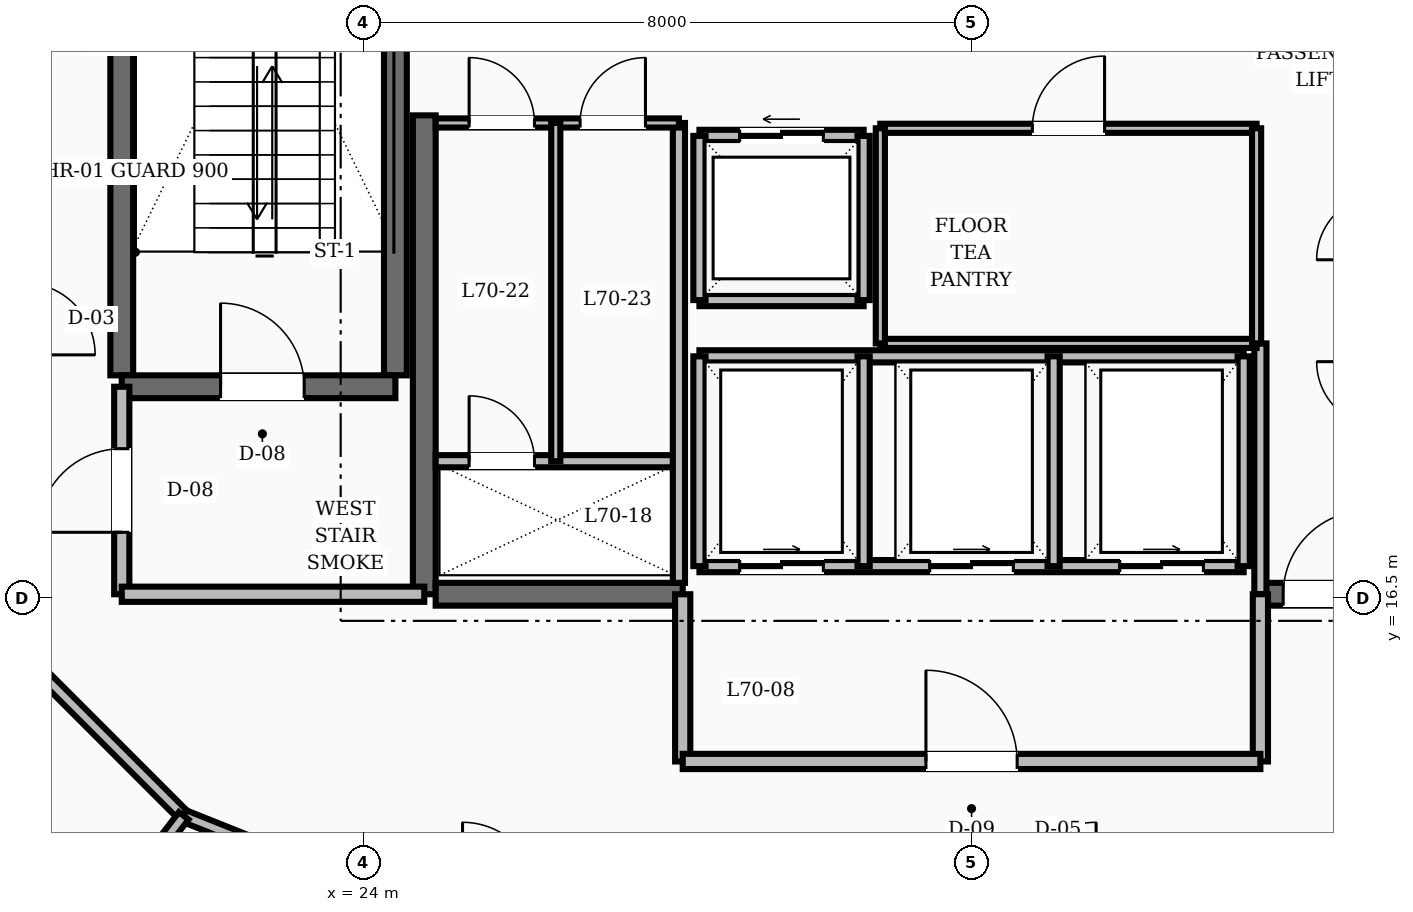
"""IFC4 building model, lengths in metres.
Left out: names, types, materials, properties, quantities, classifications, styles, units other than length and angle.
Written with IfcOpenShell. Run it as: python <this file> out.ifc"""

import sys

from ifc_helpers import new_model, si_unit, direction, frame, frame_2d, origin, place, context, subcontext, project, spatial, rectangle, extrude, element, fill, save


model = new_model("IFC4")
c1 = context("Model", 3, precision=1e-05, world=origin(), true_north=direction((0.0, 1.0)))
c2 = subcontext(c1, "Body", "Model", "MODEL_VIEW")
j1 = project(units=[si_unit("LENGTHUNIT", "METRE"), si_unit("PLANEANGLEUNIT", "RADIAN")], contexts=[c1])
p1 = place(None, origin())
s1 = spatial("IfcSite", under=j1, at=p1, CompositionType="ELEMENT")
p2 = place(p1, origin())
s2 = spatial("IfcBuilding", under=s1, at=p2, CompositionType="ELEMENT")
p3 = place(p2, frame((0.0, 0.0, 268.8)))
s3 = spatial("IfcBuildingStorey", under=s2, at=p3, CompositionType="ELEMENT", Elevation=268.8)
p4 = place(p3, frame((24.8, 16.55, 0.0), z_axis=(0.0, 0.0, 1.0), x_axis=(0.0, 1.0, 0.0)))
e1 = element("IfcWall", 1, at=p4, inside=s3, PredefinedType="SHEAR", context=c2, shape_type="SweptSolid", body=[
    extrude(rectangle(XDim=6.3, YDim=0.3, at=frame_2d((3.15, 0.0))), origin(), (0.0, 0.0, 1.0), 3.6),
])
p5 = place(p3, frame((24.95, 16.55, 0.0), z_axis=(0.0, 0.0, 1.0), x_axis=(1.0, 0.0, 0.0)))
e2 = element("IfcWall", 2, at=p5, inside=s3, PredefinedType="SHEAR", context=c2, shape_type="SweptSolid", body=[
    extrude(rectangle(XDim=3.25, YDim=0.3, at=frame_2d((1.625, 0.0))), origin(), (0.0, 0.0, 1.0), 3.6),
])
p6 = place(p3, frame((35.8, 16.55, 0.0), z_axis=(0.0, 0.0, 1.0), x_axis=(1.0, 0.0, 0.0)))
e3 = element("IfcWall", 3, at=p6, inside=s3, PredefinedType="SHEAR", context=c2, shape_type="SweptSolid", body=[
    extrude(rectangle(XDim=3.25, YDim=0.3, at=frame_2d((1.625, 0.0))), origin(), (0.0, 0.0, 1.0), 3.6),
])
p7 = place(p6, frame((0.3, 0.0, 0.0)))
e4 = element("IfcOpeningElement", 4, at=p7, cuts=e3, PredefinedType="OPENING", context=c2, shape_type="SweptSolid", body=[
    extrude(rectangle(XDim=1.1, YDim=2.1, at=frame_2d((0.55, 1.05))), frame((0.0, 0.16, 0.0), z_axis=(0.0, -1.0, 0.0), x_axis=(1.0, 0.0, 0.0)), (0.0, 0.0, 1.0), 0.32),
])
for number, where, z_axis, x_axis in (
    (5, (20.82, 19.43, 0.0), (0.0, 0.0, 1.0), (0.0, 1.0, 0.0)),
    (6, (24.42, 19.43, 0.0), (0.0, 0.0, 1.0), (0.0, 1.0, 0.0)),
):
    element("IfcWall", number, at=place(p3, frame(where, z_axis=z_axis, x_axis=x_axis)), inside=s3, PredefinedType="SHEAR", context=c2, shape_type="SweptSolid", body=[
        extrude(rectangle(XDim=8.74, YDim=0.3, at=frame_2d((4.37, 0.0))), origin(), (0.0, 0.0, 1.0), 3.6),
    ])
p8 = place(p3, frame((20.82, 19.28, 0.0), z_axis=(0.0, 0.0, 1.0), x_axis=(1.0, 0.0, 0.0)))
e7 = element("IfcWall", 7, at=p8, inside=s3, PredefinedType="SHEAR", context=c2, shape_type="SweptSolid", body=[
    extrude(rectangle(XDim=3.6, YDim=0.3, at=frame_2d((1.8, 0.0))), origin(), (0.0, 0.0, 1.0), 3.6),
])
p9 = place(p8, frame((1.3, 0.0, 0.0)))
e8 = element("IfcOpeningElement", 8, at=p9, cuts=e7, PredefinedType="OPENING", context=c2, shape_type="SweptSolid", body=[
    extrude(rectangle(XDim=1.1, YDim=2.1, at=frame_2d((0.55, 1.05))), frame((0.0, 0.16, 0.0), z_axis=(0.0, -1.0, 0.0), x_axis=(1.0, 0.0, 0.0)), (0.0, 0.0, 1.0), 0.32),
])
p10 = place(p3, frame((20.82, 16.55, 0.0), z_axis=(0.0, 0.0, 1.0), x_axis=(0.0, 1.0, 0.0)))
e9 = element("IfcWall", 9, at=p10, inside=s3, PredefinedType="SOLIDWALL", context=c2, shape_type="SweptSolid", body=[
    extrude(rectangle(XDim=2.73, YDim=0.2, at=frame_2d((1.365, 0.0))), origin(), (0.0, 0.0, 1.0), 2.87),
])
p11 = place(p10, frame((0.815, 0.0, 0.0)))
e10 = element("IfcOpeningElement", 10, at=p11, cuts=e9, PredefinedType="OPENING", context=c2, shape_type="SweptSolid", body=[
    extrude(rectangle(XDim=1.1, YDim=2.1, at=frame_2d((0.55, 1.05))), frame((0.0, 0.11, 0.0), z_axis=(0.0, -1.0, 0.0), x_axis=(1.0, 0.0, 0.0)), (0.0, 0.0, 1.0), 0.22),
])
p12 = place(p3, frame((20.82, 16.55, 0.0), z_axis=(0.0, 0.0, 1.0), x_axis=(1.0, 0.0, 0.0)))
e11 = element("IfcWall", 11, at=p12, inside=s3, PredefinedType="SOLIDWALL", context=c2, shape_type="SweptSolid", body=[
    extrude(rectangle(XDim=3.98, YDim=0.2, at=frame_2d((1.99, 0.0))), origin(), (0.0, 0.0, 1.0), 2.87),
])
p13 = place(p3, frame((35.8, 16.55, 0.0), z_axis=(0.0, 0.0, 1.0), x_axis=(0.0, 1.0, 0.0)))
e12 = element("IfcWall", 12, at=p13, inside=s3, PredefinedType="SOLIDWALL", context=c2, shape_type="SweptSolid", body=[
    extrude(rectangle(XDim=3.3, YDim=0.16, at=frame_2d((1.65, 0.0))), origin(), (0.0, 0.0, 1.0), 2.87),
])
for number, where, z_axis, x_axis in (
    (13, (28.2, 14.35, 0.0), (0.0, 0.0, 1.0), (0.0, 1.0, 0.0)),
    (14, (35.8, 14.35, 0.0), (0.0, 0.0, 1.0), (0.0, 1.0, 0.0)),
):
    element("IfcWall", number, at=place(p3, frame(where, z_axis=z_axis, x_axis=x_axis)), inside=s3, PredefinedType="SOLIDWALL", context=c2, shape_type="SweptSolid", body=[
        extrude(rectangle(XDim=2.2, YDim=0.2, at=frame_2d((1.1, 0.0))), origin(), (0.0, 0.0, 1.0), 2.87),
    ])
p14 = place(p3, frame((28.2, 14.35, 0.0), z_axis=(0.0, 0.0, 1.0), x_axis=(1.0, 0.0, 0.0)))
e15 = element("IfcWall", 15, at=p14, inside=s3, PredefinedType="SOLIDWALL", context=c2, shape_type="SweptSolid", body=[
    extrude(rectangle(XDim=7.6, YDim=0.2, at=frame_2d((3.8, 0.0))), origin(), (0.0, 0.0, 1.0), 2.87),
])
p15 = place(p14, frame((3.2, 0.0, 0.0)))
e16 = element("IfcOpeningElement", 16, at=p15, cuts=e15, PredefinedType="OPENING", context=c2, shape_type="SweptSolid", body=[
    extrude(rectangle(XDim=1.2, YDim=2.1, at=frame_2d((0.6, 1.05))), frame((0.0, 0.11, 0.0), z_axis=(0.0, -1.0, 0.0), x_axis=(1.0, 0.0, 0.0)), (0.0, 0.0, 1.0), 0.22),
])
p16 = place(p3, frame((28.42, 22.58, 0.0), z_axis=(0.0, 0.0, 1.0), x_axis=(1.0, 0.0, 0.0)))
e17 = element("IfcWall", 17, at=p16, inside=s3, PredefinedType="SOLIDWALL", context=c2, shape_type="SweptSolid", body=[
    extrude(rectangle(XDim=2.16, YDim=0.16, at=frame_2d((1.08, 0.0))), origin(), (0.0, 0.0, 1.0), 2.87),
])
p17 = place(p16, frame((0.53, 0.0, 0.0)))
e18 = element("IfcOpeningElement", 18, at=p17, cuts=e17, PredefinedType="OPENING", context=c2, shape_type="SweptSolid", body=[
    extrude(rectangle(XDim=1.1, YDim=2.15, at=frame_2d((0.55, 1.075))), frame((0.0, 0.09, 0.0), z_axis=(0.0, -1.0, 0.0), x_axis=(1.0, 0.0, 0.0)), (0.0, 0.0, 1.0), 0.18),
])
for number, where, z_axis, x_axis in (
    (19, (28.42, 20.42, 0.0), (0.0, 0.0, 1.0), (1.0, 0.0, 0.0)),
    (20, (28.42, 20.42, 0.0), (0.0, 0.0, 1.0), (0.0, 1.0, 0.0)),
    (21, (30.58, 20.42, 0.0), (0.0, 0.0, 1.0), (0.0, 1.0, 0.0)),
):
    element("IfcWall", number, at=place(p3, frame(where, z_axis=z_axis, x_axis=x_axis)), inside=s3, PredefinedType="SOLIDWALL", context=c2, shape_type="SweptSolid", body=[
        extrude(rectangle(XDim=2.16, YDim=0.16, at=frame_2d((1.08, 0.0))), origin(), (0.0, 0.0, 1.0), 2.87),
    ])
p18 = place(p3, frame((28.42, 16.92, 0.0), z_axis=(0.0, 0.0, 1.0), x_axis=(1.0, 0.0, 0.0)))
e22 = element("IfcWall", 22, at=p18, inside=s3, PredefinedType="SOLIDWALL", context=c2, shape_type="SweptSolid", body=[
    extrude(rectangle(XDim=7.16, YDim=0.16, at=frame_2d((3.58, 0.0))), origin(), (0.0, 0.0, 1.0), 2.87),
])
p19 = place(p18, frame((0.53, 0.0, 0.0)))
e23 = element("IfcOpeningElement", 23, at=p19, cuts=e22, PredefinedType="OPENING", context=c2, shape_type="SweptSolid", body=[
    extrude(rectangle(XDim=1.1, YDim=2.15, at=frame_2d((0.55, 1.075))), frame((0.0, 0.09, 0.0), z_axis=(0.0, -1.0, 0.0), x_axis=(1.0, 0.0, 0.0)), (0.0, 0.0, 1.0), 0.18),
])
p20 = place(p18, frame((3.03, 0.0, 0.0)))
e24 = element("IfcOpeningElement", 24, at=p20, cuts=e22, PredefinedType="OPENING", context=c2, shape_type="SweptSolid", body=[
    extrude(rectangle(XDim=1.1, YDim=2.15, at=frame_2d((0.55, 1.075))), frame((0.0, 0.09, 0.0), z_axis=(0.0, -1.0, 0.0), x_axis=(1.0, 0.0, 0.0)), (0.0, 0.0, 1.0), 0.18),
])
p21 = place(p18, frame((5.53, 0.0, 0.0)))
e25 = element("IfcOpeningElement", 25, at=p21, cuts=e22, PredefinedType="OPENING", context=c2, shape_type="SweptSolid", body=[
    extrude(rectangle(XDim=1.1, YDim=2.15, at=frame_2d((0.55, 1.075))), frame((0.0, 0.09, 0.0), z_axis=(0.0, -1.0, 0.0), x_axis=(1.0, 0.0, 0.0)), (0.0, 0.0, 1.0), 0.18),
])
p22 = place(p3, frame((28.42, 19.68, 0.0), z_axis=(0.0, 0.0, 1.0), x_axis=(1.0, 0.0, 0.0)))
e26 = element("IfcWall", 26, at=p22, inside=s3, PredefinedType="SOLIDWALL", context=c2, shape_type="SweptSolid", body=[
    extrude(rectangle(XDim=7.16, YDim=0.16, at=frame_2d((3.58, 0.0))), origin(), (0.0, 0.0, 1.0), 2.87),
])
for number, where, z_axis, x_axis in (
    (27, (28.42, 16.92, 0.0), (0.0, 0.0, 1.0), (0.0, 1.0, 0.0)),
    (28, (30.58, 16.92, 0.0), (0.0, 0.0, 1.0), (0.0, 1.0, 0.0)),
    (29, (33.08, 16.92, 0.0), (0.0, 0.0, 1.0), (0.0, 1.0, 0.0)),
    (30, (35.58, 16.92, 0.0), (0.0, 0.0, 1.0), (0.0, 1.0, 0.0)),
):
    element("IfcWall", number, at=place(p3, frame(where, z_axis=z_axis, x_axis=x_axis)), inside=s3, PredefinedType="SOLIDWALL", context=c2, shape_type="SweptSolid", body=[
        extrude(rectangle(XDim=2.76, YDim=0.16, at=frame_2d((1.38, 0.0))), origin(), (0.0, 0.0, 1.0), 2.87),
    ])
p23 = place(p3, frame((30.8, 22.68, 0.0), z_axis=(0.0, 0.0, 1.0), x_axis=(1.0, 0.0, 0.0)))
e31 = element("IfcWall", 31, at=p23, inside=s3, PredefinedType="PARTITIONING", context=c2, shape_type="SweptSolid", body=[
    extrude(rectangle(XDim=4.95, YDim=0.12, at=frame_2d((2.475, 0.0))), origin(), (0.0, 0.0, 1.0), 2.87),
])
p24 = place(p23, frame((2.0, 0.0, 0.0)))
e32 = element("IfcOpeningElement", 32, at=p24, cuts=e31, PredefinedType="OPENING", context=c2, shape_type="SweptSolid", body=[
    extrude(rectangle(XDim=0.95, YDim=2.1, at=frame_2d((0.475, 1.05))), frame((0.0, 0.07, 0.0), z_axis=(0.0, -1.0, 0.0), x_axis=(1.0, 0.0, 0.0)), (0.0, 0.0, 1.0), 0.14),
])
p25 = place(p3, frame((30.8, 19.85, 0.0), z_axis=(0.0, 0.0, 1.0), x_axis=(1.0, 0.0, 0.0)))
e33 = element("IfcWall", 33, at=p25, inside=s3, PredefinedType="PARTITIONING", context=c2, shape_type="SweptSolid", body=[
    extrude(rectangle(XDim=4.95, YDim=0.12, at=frame_2d((2.475, 0.0))), origin(), (0.0, 0.0, 1.0), 2.87),
])
for number, where, z_axis, x_axis in (
    (34, (30.8, 19.85, 0.0), (0.0, 0.0, 1.0), (0.0, 1.0, 0.0)),
    (35, (35.75, 19.85, 0.0), (0.0, 0.0, 1.0), (0.0, 1.0, 0.0)),
):
    element("IfcWall", number, at=place(p3, frame(where, z_axis=z_axis, x_axis=x_axis)), inside=s3, PredefinedType="PARTITIONING", context=c2, shape_type="SweptSolid", body=[
        extrude(rectangle(XDim=2.83, YDim=0.12, at=frame_2d((1.415, 0.0))), origin(), (0.0, 0.0, 1.0), 2.87),
    ])
p26 = place(p3, frame((24.95, 18.3, 0.0), z_axis=(0.0, 0.0, 1.0), x_axis=(1.0, 0.0, 0.0)))
e36 = element("IfcWall", 36, at=p26, inside=s3, PredefinedType="SOLIDWALL", context=c2, shape_type="SweptSolid", body=[
    extrude(rectangle(XDim=3.2, YDim=0.16, at=frame_2d((1.6, 0.0))), origin(), (0.0, 0.0, 1.0), 2.87),
])
p27 = place(p26, frame((0.44, 0.0, 0.0)))
e37 = element("IfcOpeningElement", 37, at=p27, cuts=e36, PredefinedType="OPENING", context=c2, shape_type="SweptSolid", body=[
    extrude(rectangle(XDim=0.86, YDim=2.05, at=frame_2d((0.43, 1.025))), frame((0.0, 0.09, 0.0), z_axis=(0.0, -1.0, 0.0), x_axis=(1.0, 0.0, 0.0)), (0.0, 0.0, 1.0), 0.18),
])
p28 = place(p3, frame((28.15, 16.7, 0.0), z_axis=(0.0, 0.0, 1.0), x_axis=(0.0, 1.0, 0.0)))
e38 = element("IfcWall", 38, at=p28, inside=s3, PredefinedType="SOLIDWALL", context=c2, shape_type="SweptSolid", body=[
    extrude(rectangle(XDim=6.05, YDim=0.16, at=frame_2d((3.025, 0.0))), origin(), (0.0, 0.0, 1.0), 2.87),
])
p29 = place(p3, frame((24.95, 22.75, 0.0), z_axis=(0.0, 0.0, 1.0), x_axis=(1.0, 0.0, 0.0)))
e39 = element("IfcWall", 39, at=p29, inside=s3, PredefinedType="PARTITIONING", context=c2, shape_type="SweptSolid", body=[
    extrude(rectangle(XDim=3.2, YDim=0.12, at=frame_2d((1.6, 0.0))), origin(), (0.0, 0.0, 1.0), 2.87),
])
p30 = place(p29, frame((0.44, 0.0, 0.0)))
e40 = element("IfcOpeningElement", 40, at=p30, cuts=e39, PredefinedType="OPENING", context=c2, shape_type="SweptSolid", body=[
    extrude(rectangle(XDim=0.86, YDim=2.1, at=frame_2d((0.43, 1.05))), frame((0.0, 0.07, 0.0), z_axis=(0.0, -1.0, 0.0), x_axis=(1.0, 0.0, 0.0)), (0.0, 0.0, 1.0), 0.14),
])
p31 = place(p29, frame((1.9, 0.0, 0.0)))
e41 = element("IfcOpeningElement", 41, at=p31, cuts=e39, PredefinedType="OPENING", context=c2, shape_type="SweptSolid", body=[
    extrude(rectangle(XDim=0.86, YDim=2.1, at=frame_2d((0.43, 1.05))), frame((0.0, 0.07, 0.0), z_axis=(0.0, -1.0, 0.0), x_axis=(1.0, 0.0, 0.0)), (0.0, 0.0, 1.0), 0.14),
])
p32 = place(p3, frame((26.53, 18.3, 0.0), z_axis=(0.0, 0.0, 1.0), x_axis=(0.0, 1.0, 0.0)))
e42 = element("IfcWall", 42, at=p32, inside=s3, PredefinedType="PARTITIONING", context=c2, shape_type="SweptSolid", body=[
    extrude(rectangle(XDim=4.45, YDim=0.12, at=frame_2d((2.225, 0.0))), origin(), (0.0, 0.0, 1.0), 2.87),
])
p33 = place(p3, frame((19.573, 15.697, 0.0), z_axis=(0.0, 0.0, 1.0), x_axis=(0.707106781187, -0.707106781187, 0.0)))
e43 = element("IfcWall", 43, at=p33, inside=s3, PredefinedType="SOLIDWALL", context=c2, shape_type="SweptSolid", body=[
    extrude(rectangle(XDim=2.916, YDim=0.16, at=frame_2d((1.458, 0.0))), origin(), (0.0, 0.0, 1.0), 2.87),
])
p34 = place(p3, frame((21.635, 13.635, 0.0), z_axis=(0.0, 0.0, 1.0), x_axis=(0.92856882165, -0.371160266542, 0.0)))
e44 = element("IfcWall", 44, at=p34, inside=s3, PredefinedType="SOLIDWALL", context=c2, shape_type="SweptSolid", body=[
    extrude(rectangle(XDim=2.923, YDim=0.16, at=frame_2d((1.461, 0.0))), origin(), (0.0, 0.0, 1.0), 2.87),
])
p35 = place(p3, frame((21.635, 13.635, 0.0), z_axis=(0.0, 0.0, 1.0), x_axis=(-0.609053303756, -0.793129291593, 0.0)))
e45 = element("IfcWall", 45, at=p35, inside=s3, PredefinedType="SOLIDWALL", context=c2, shape_type="SweptSolid", body=[
    extrude(rectangle(XDim=5.637, YDim=0.16, at=frame_2d((2.818, 0.0))), origin(), (0.0, 0.0, 1.0), 2.87),
])
p36 = place(p9, origin())
e46 = element("IfcDoor", 46, at=p36, inside=s3, OperationType="SINGLE_SWING_LEFT", PredefinedType="DOOR", context=c2, shape_type="SweptSolid", body=[
    extrude(rectangle(XDim=1.1, YDim=2.1, at=frame_2d((0.55, 1.05))), frame((0.0, 0.025, 0.0), z_axis=(0.0, -1.0, 0.0), x_axis=(1.0, 0.0, 0.0)), (0.0, 0.0, 1.0), 0.05),
])
fill(e8, e46)
p37 = place(p11, origin())
e47 = element("IfcDoor", 47, at=p37, inside=s3, OperationType="SINGLE_SWING_LEFT", PredefinedType="DOOR", context=c2, shape_type="SweptSolid", body=[
    extrude(rectangle(XDim=1.1, YDim=2.1, at=frame_2d((0.55, 1.05))), frame((0.0, 0.025, 0.0), z_axis=(0.0, -1.0, 0.0), x_axis=(1.0, 0.0, 0.0)), (0.0, 0.0, 1.0), 0.05),
])
fill(e10, e47)
p38 = place(p7, origin())
e48 = element("IfcDoor", 48, at=p38, inside=s3, OperationType="SINGLE_SWING_RIGHT", PredefinedType="DOOR", context=c2, shape_type="SweptSolid", body=[
    extrude(rectangle(XDim=1.1, YDim=2.1, at=frame_2d((0.55, 1.05))), frame((0.0, 0.025, 0.0), z_axis=(0.0, -1.0, 0.0), x_axis=(1.0, 0.0, 0.0)), (0.0, 0.0, 1.0), 0.05),
])
fill(e4, e48)
p39 = place(p15, origin())
e49 = element("IfcDoor", 49, at=p39, inside=s3, OperationType="SINGLE_SWING_LEFT", PredefinedType="DOOR", context=c2, shape_type="SweptSolid", body=[
    extrude(rectangle(XDim=1.2, YDim=2.1, at=frame_2d((0.6, 1.05))), frame((0.0, 0.025, 0.0), z_axis=(0.0, -1.0, 0.0), x_axis=(1.0, 0.0, 0.0)), (0.0, 0.0, 1.0), 0.05),
])
fill(e16, e49)
p40 = place(p17, origin())
e50 = element("IfcDoor", 50, at=p40, inside=s3, OperationType="SLIDING_TO_LEFT", PredefinedType="DOOR", context=c2, shape_type="SweptSolid", body=[
    extrude(rectangle(XDim=1.1, YDim=2.15, at=frame_2d((0.55, 1.075))), frame((0.0, 0.025, 0.0), z_axis=(0.0, -1.0, 0.0), x_axis=(1.0, 0.0, 0.0)), (0.0, 0.0, 1.0), 0.05),
])
fill(e18, e50)
p41 = place(p19, origin())
e51 = element("IfcDoor", 51, at=p41, inside=s3, OperationType="SLIDING_TO_RIGHT", PredefinedType="DOOR", context=c2, shape_type="SweptSolid", body=[
    extrude(rectangle(XDim=1.1, YDim=2.15, at=frame_2d((0.55, 1.075))), frame((0.0, 0.025, 0.0), z_axis=(0.0, -1.0, 0.0), x_axis=(1.0, 0.0, 0.0)), (0.0, 0.0, 1.0), 0.05),
])
fill(e23, e51)
p42 = place(p20, origin())
e52 = element("IfcDoor", 52, at=p42, inside=s3, OperationType="SLIDING_TO_RIGHT", PredefinedType="DOOR", context=c2, shape_type="SweptSolid", body=[
    extrude(rectangle(XDim=1.1, YDim=2.15, at=frame_2d((0.55, 1.075))), frame((0.0, 0.025, 0.0), z_axis=(0.0, -1.0, 0.0), x_axis=(1.0, 0.0, 0.0)), (0.0, 0.0, 1.0), 0.05),
])
fill(e24, e52)
p43 = place(p21, origin())
e53 = element("IfcDoor", 53, at=p43, inside=s3, OperationType="SLIDING_TO_RIGHT", PredefinedType="DOOR", context=c2, shape_type="SweptSolid", body=[
    extrude(rectangle(XDim=1.1, YDim=2.15, at=frame_2d((0.55, 1.075))), frame((0.0, 0.025, 0.0), z_axis=(0.0, -1.0, 0.0), x_axis=(1.0, 0.0, 0.0)), (0.0, 0.0, 1.0), 0.05),
])
fill(e25, e53)
p44 = place(p24, origin())
e54 = element("IfcDoor", 54, at=p44, inside=s3, OperationType="SINGLE_SWING_RIGHT", PredefinedType="DOOR", context=c2, shape_type="SweptSolid", body=[
    extrude(rectangle(XDim=0.95, YDim=2.1, at=frame_2d((0.475, 1.05))), frame((0.0, 0.025, 0.0), z_axis=(0.0, -1.0, 0.0), x_axis=(1.0, 0.0, 0.0)), (0.0, 0.0, 1.0), 0.05),
])
fill(e32, e54)
p45 = place(p27, origin())
e55 = element("IfcDoor", 55, at=p45, inside=s3, OperationType="SINGLE_SWING_LEFT", PredefinedType="TRAPDOOR", context=c2, shape_type="SweptSolid", body=[
    extrude(rectangle(XDim=0.86, YDim=2.05, at=frame_2d((0.43, 1.025))), frame((0.0, 0.025, 0.0), z_axis=(0.0, -1.0, 0.0), x_axis=(1.0, 0.0, 0.0)), (0.0, 0.0, 1.0), 0.05),
])
fill(e37, e55)
p46 = place(p30, origin())
e56 = element("IfcDoor", 56, at=p46, inside=s3, OperationType="SINGLE_SWING_LEFT", PredefinedType="DOOR", context=c2, shape_type="SweptSolid", body=[
    extrude(rectangle(XDim=0.86, YDim=2.1, at=frame_2d((0.43, 1.05))), frame((0.0, 0.025, 0.0), z_axis=(0.0, -1.0, 0.0), x_axis=(1.0, 0.0, 0.0)), (0.0, 0.0, 1.0), 0.05),
])
fill(e40, e56)
p47 = place(p31, origin())
e57 = element("IfcDoor", 57, at=p47, inside=s3, OperationType="SINGLE_SWING_RIGHT", PredefinedType="DOOR", context=c2, shape_type="SweptSolid", body=[
    extrude(rectangle(XDim=0.86, YDim=2.1, at=frame_2d((0.43, 1.05))), frame((0.0, 0.025, 0.0), z_axis=(0.0, -1.0, 0.0), x_axis=(1.0, 0.0, 0.0)), (0.0, 0.0, 1.0), 0.05),
])
fill(e41, e57)
save(model, sys.argv[1])
